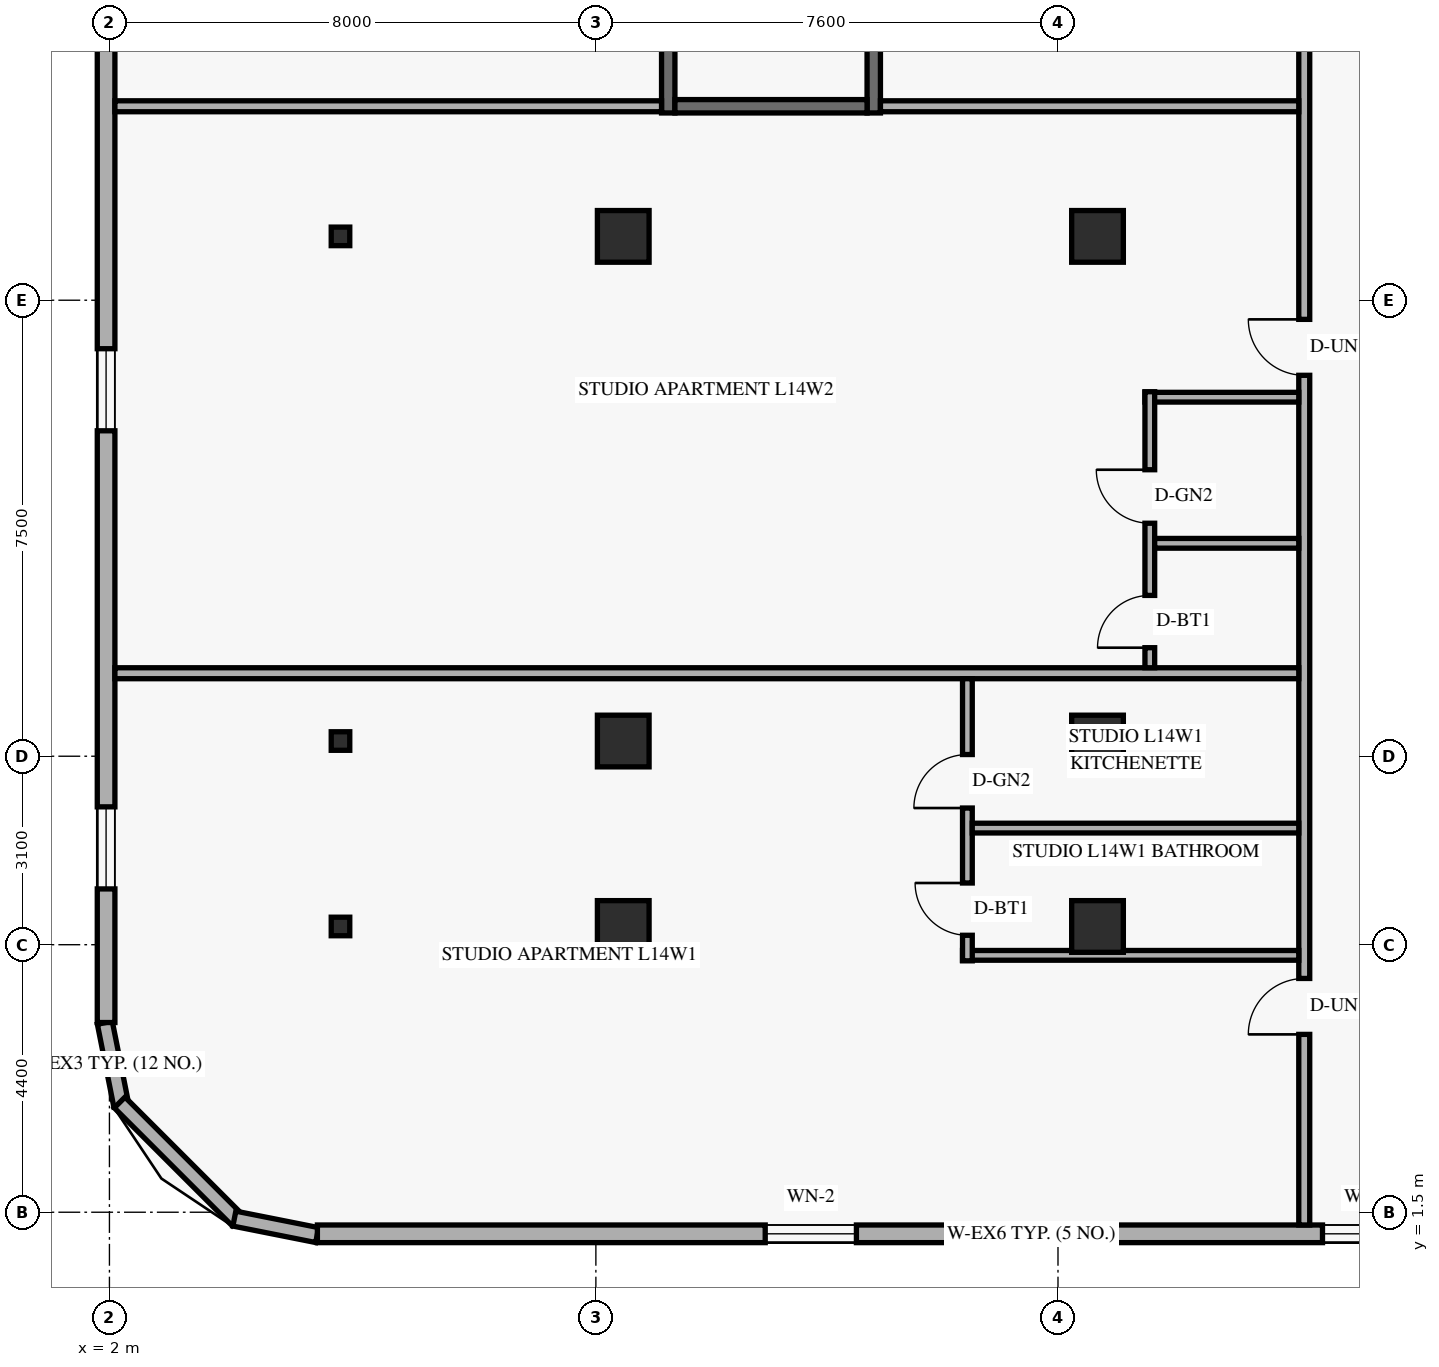
"""IFC4 building model, lengths in metres.
Left out: names, types, materials, properties, quantities, classifications, styles, units other than length and angle.
Written with IfcOpenShell. Run it as: python <this file> out.ifc"""

import sys

from ifc_helpers import new_model, si_unit, direction, frame, frame_2d, origin, origin_2d, place, context, subcontext, project, spatial, rectangle, hollow_rectangle, extrude, element, fill, save


model = new_model("IFC4")
c1 = context("Model", 3, precision=1e-05, world=origin(), true_north=direction((0.0, 1.0)))
c2 = subcontext(c1, "Body", "Model", "MODEL_VIEW")
j1 = project(units=[si_unit("LENGTHUNIT", "METRE"), si_unit("PLANEANGLEUNIT", "RADIAN")], contexts=[c1])
p1 = place(None, origin())
s1 = spatial("IfcSite", under=j1, at=p1, CompositionType="ELEMENT")
p2 = place(p1, origin())
s2 = spatial("IfcBuilding", under=s1, at=p2, CompositionType="ELEMENT")
p3 = place(p2, frame((0.0, 0.0, 56.4)))
s3 = spatial("IfcBuildingStorey", under=s2, at=p3, CompositionType="ELEMENT", Elevation=56.4)
for number, where, z_axis, x_axis in (
    (1, (11.19, 19.58, 0.0), (0.0, 0.0, 1.0), (0.0, 1.0, 0.0)),
    (2, (14.57, 19.58, 0.0), (0.0, 0.0, 1.0), (0.0, 1.0, 0.0)),
):
    element("IfcWall", number, at=place(p3, frame(where, z_axis=z_axis, x_axis=x_axis)), inside=s3, PredefinedType="SHEAR", context=c2, shape_type="SweptSolid", body=[
        extrude(rectangle(XDim=7.98, YDim=0.22, at=frame_2d((3.99, 0.0))), origin(), (0.0, 0.0, 1.0), 2.657),
    ])
p4 = place(p3, frame((11.3, 19.69, 0.0), z_axis=(0.0, 0.0, 1.0), x_axis=(1.0, 0.0, 0.0)))
e3 = element("IfcWall", 3, at=p4, inside=s3, PredefinedType="SHEAR", context=c2, shape_type="SweptSolid", body=[
    extrude(rectangle(XDim=3.16, YDim=0.22, at=frame_2d((1.58, 0.0))), origin(), (0.0, 0.0, 1.0), 2.657),
])
for number, where, z_axis, x_axis in (
    (4, (5.8, 6.2, 0.0), (0.0, 0.0, 1.0), (1.0, 0.0, 0.0)),
    (5, (5.8, 9.25, 0.0), (0.0, 0.0, 1.0), (1.0, 0.0, 0.0)),
    (6, (5.8, 17.55, 0.0), (0.0, 0.0, 1.0), (1.0, 0.0, 0.0)),
):
    element("IfcColumn", number, at=place(p3, frame(where, z_axis=z_axis, x_axis=x_axis)), inside=s3, PredefinedType="COLUMN", context=c2, shape_type="SweptSolid", body=[
        extrude(hollow_rectangle(XDim=0.305, YDim=0.305, WallThickness=0.013, at=origin_2d()), origin(), (0.0, 0.0, 1.0), 3.6),
    ])
for number, where, z_axis, x_axis in (
    (7, (10.45, 6.2, 0.0), (0.0, 0.0, 1.0), (1.0, 0.0, 0.0)),
    (8, (10.45, 9.25, 0.0), (0.0, 0.0, 1.0), (1.0, 0.0, 0.0)),
    (9, (10.45, 17.55, 0.0), (0.0, 0.0, 1.0), (1.0, 0.0, 0.0)),
    (10, (18.25, 6.2, 0.0), (0.0, 0.0, 1.0), (1.0, 0.0, 0.0)),
    (11, (18.25, 9.25, 0.0), (0.0, 0.0, 1.0), (1.0, 0.0, 0.0)),
    (12, (18.25, 17.55, 0.0), (0.0, 0.0, 1.0), (1.0, 0.0, 0.0)),
):
    element("IfcColumn", number, at=place(p3, frame(where, z_axis=z_axis, x_axis=x_axis)), inside=s3, PredefinedType="COLUMN", context=c2, shape_type="SweptSolid", body=[
        extrude(rectangle(XDim=0.85, YDim=0.85, at=origin_2d()), origin(), (0.0, 0.0, 1.0), 3.6),
    ])
p5 = place(p3, frame((1.924, 4.616, 0.0), z_axis=(0.0, 0.0, 1.0), x_axis=(0.19496651342, -0.980809899341, 0.0)))
e13 = element("IfcWall", 13, at=p5, inside=s3, PredefinedType="SOLIDWALL", context=c2, shape_type="SweptSolid", body=[
    extrude(rectangle(XDim=1.389, YDim=0.25, at=frame_2d((0.694, 0.0))), origin(), (0.0, 0.0, 1.0), 3.35),
])
p6 = place(p3, frame((2.168, 3.305, 0.0), z_axis=(0.0, 0.0, 1.0), x_axis=(0.707106781187, -0.707106781187, 0.0)))
e14 = element("IfcWall", 14, at=p6, inside=s3, PredefinedType="SOLIDWALL", context=c2, shape_type="SweptSolid", body=[
    extrude(rectangle(XDim=2.739, YDim=0.25, at=frame_2d((1.37, 0.0))), origin(), (0.0, 0.0, 1.0), 3.35),
])
p7 = place(p3, frame((4.054, 1.395, 0.0), z_axis=(0.0, 0.0, 1.0), x_axis=(0.980809899341, -0.19496651342, 0.0)))
e15 = element("IfcWall", 15, at=p7, inside=s3, PredefinedType="SOLIDWALL", context=c2, shape_type="SweptSolid", body=[
    extrude(rectangle(XDim=1.389, YDim=0.25, at=frame_2d((0.694, 0.0))), origin(), (0.0, 0.0, 1.0), 3.35),
])
p8 = place(p3, frame((5.42, 1.145, 0.0), z_axis=(0.0, 0.0, 1.0), x_axis=(1.0, 0.0, 0.0)))
e16 = element("IfcWall", 16, at=p8, inside=s3, PredefinedType="SOLIDWALL", context=c2, shape_type="SweptSolid", body=[
    extrude(rectangle(XDim=23.481, YDim=0.29, at=frame_2d((11.741, 0.0))), origin(), (0.0, 0.0, 1.0), 3.35),
])
p9 = place(p8, frame((7.365, 0.0, 0.85)))
e17 = element("IfcOpeningElement", 17, at=p9, cuts=e16, PredefinedType="OPENING", context=c2, shape_type="SweptSolid", body=[
    extrude(rectangle(XDim=1.5, YDim=1.55, at=frame_2d((0.75, 0.775))), frame((0.0, 0.155, 0.0), z_axis=(0.0, -1.0, 0.0), x_axis=(1.0, 0.0, 0.0)), (0.0, 0.0, 1.0), 0.31),
])
p10 = place(p8, frame((16.53, 0.0, 0.85)))
e18 = element("IfcOpeningElement", 18, at=p10, cuts=e16, PredefinedType="OPENING", context=c2, shape_type="SweptSolid", body=[
    extrude(rectangle(XDim=1.5, YDim=1.55, at=frame_2d((0.75, 0.775))), frame((0.0, 0.155, 0.0), z_axis=(0.0, -1.0, 0.0), x_axis=(1.0, 0.0, 0.0)), (0.0, 0.0, 1.0), 0.31),
])
p11 = place(p8, frame((20.156, 0.0, 0.85)))
e19 = element("IfcOpeningElement", 19, at=p11, cuts=e16, PredefinedType="OPENING", context=c2, shape_type="SweptSolid", body=[
    extrude(rectangle(XDim=1.5, YDim=1.55, at=frame_2d((0.75, 0.775))), frame((0.0, 0.155, 0.0), z_axis=(0.0, -1.0, 0.0), x_axis=(1.0, 0.0, 0.0)), (0.0, 0.0, 1.0), 0.31),
])
p12 = place(p3, frame((1.945, 43.38, 0.0), z_axis=(0.0, 0.0, 1.0), x_axis=(0.0, -1.0, 0.0)))
e20 = element("IfcWall", 20, at=p12, inside=s3, PredefinedType="SOLIDWALL", context=c2, shape_type="SweptSolid", body=[
    extrude(rectangle(XDim=38.76, YDim=0.29, at=frame_2d((19.38, 0.0))), origin(), (0.0, 0.0, 1.0), 3.35),
])
p13 = place(p12, frame((35.212, 0.0, 0.85)))
e21 = element("IfcOpeningElement", 21, at=p13, cuts=e20, PredefinedType="OPENING", context=c2, shape_type="SweptSolid", body=[
    extrude(rectangle(XDim=1.35, YDim=1.55, at=frame_2d((0.675, 0.775))), frame((0.0, 0.155, 0.0), z_axis=(0.0, -1.0, 0.0), x_axis=(1.0, 0.0, 0.0)), (0.0, 0.0, 1.0), 0.31),
])
p14 = place(p12, frame((27.677, 0.0, 0.85)))
e22 = element("IfcOpeningElement", 22, at=p14, cuts=e20, PredefinedType="OPENING", context=c2, shape_type="SweptSolid", body=[
    extrude(rectangle(XDim=1.35, YDim=1.55, at=frame_2d((0.675, 0.775))), frame((0.0, 0.155, 0.0), z_axis=(0.0, -1.0, 0.0), x_axis=(1.0, 0.0, 0.0)), (0.0, 0.0, 1.0), 0.31),
])
p15 = place(p12, frame((18.19, 0.0, 0.85)))
e23 = element("IfcOpeningElement", 23, at=p15, cuts=e20, PredefinedType="OPENING", context=c2, shape_type="SweptSolid", body=[
    extrude(rectangle(XDim=1.35, YDim=1.55, at=frame_2d((0.675, 0.775))), frame((0.0, 0.155, 0.0), z_axis=(0.0, -1.0, 0.0), x_axis=(1.0, 0.0, 0.0)), (0.0, 0.0, 1.0), 0.31),
])
p16 = place(p12, frame((8.965, 0.0, 0.85)))
e24 = element("IfcOpeningElement", 24, at=p16, cuts=e20, PredefinedType="OPENING", context=c2, shape_type="SweptSolid", body=[
    extrude(rectangle(XDim=1.35, YDim=1.55, at=frame_2d((0.675, 0.775))), frame((0.0, 0.155, 0.0), z_axis=(0.0, -1.0, 0.0), x_axis=(1.0, 0.0, 0.0)), (0.0, 0.0, 1.0), 0.31),
])
p17 = place(p12, frame((1.945, 0.0, 0.85)))
e25 = element("IfcOpeningElement", 25, at=p17, cuts=e20, PredefinedType="OPENING", context=c2, shape_type="SweptSolid", body=[
    extrude(rectangle(XDim=1.35, YDim=1.55, at=frame_2d((0.675, 0.775))), frame((0.0, 0.155, 0.0), z_axis=(0.0, -1.0, 0.0), x_axis=(1.0, 0.0, 0.0)), (0.0, 0.0, 1.0), 0.31),
])
p18 = place(p3, frame((21.65, 1.29, 0.0), z_axis=(0.0, 0.0, 1.0), x_axis=(0.0, 1.0, 0.0)))
e26 = element("IfcWall", 26, at=p18, inside=s3, PredefinedType="STANDARD", context=c2, shape_type="SweptSolid", body=[
    extrude(rectangle(XDim=45.42, YDim=0.18, at=frame_2d((22.71, 0.0))), origin(), (0.0, 0.0, 1.0), 2.639),
])
p19 = place(p18, frame((3.135, 0.0, 0.0)))
e27 = element("IfcOpeningElement", 27, at=p19, cuts=e26, PredefinedType="OPENING", context=c2, shape_type="SweptSolid", body=[
    extrude(rectangle(XDim=0.92, YDim=2.15, at=frame_2d((0.46, 1.075))), frame((0.0, 0.1, 0.0), z_axis=(0.0, -1.0, 0.0), x_axis=(1.0, 0.0, 0.0)), (0.0, 0.0, 1.0), 0.2),
])
p20 = place(p18, frame((13.975, 0.0, 0.0)))
e28 = element("IfcOpeningElement", 28, at=p20, cuts=e26, PredefinedType="OPENING", context=c2, shape_type="SweptSolid", body=[
    extrude(rectangle(XDim=0.92, YDim=2.15, at=frame_2d((0.46, 1.075))), frame((0.0, 0.1, 0.0), z_axis=(0.0, -1.0, 0.0), x_axis=(1.0, 0.0, 0.0)), (0.0, 0.0, 1.0), 0.2),
])
p21 = place(p18, frame((20.91, 0.0, 0.0)))
e29 = element("IfcOpeningElement", 29, at=p21, cuts=e26, PredefinedType="OPENING", context=c2, shape_type="SweptSolid", body=[
    extrude(rectangle(XDim=0.95, YDim=2.15, at=frame_2d((0.475, 1.075))), frame((0.0, 0.1, 0.0), z_axis=(0.0, -1.0, 0.0), x_axis=(1.0, 0.0, 0.0)), (0.0, 0.0, 1.0), 0.2),
])
p22 = place(p18, frame((32.95, 0.0, 0.0)))
e30 = element("IfcOpeningElement", 30, at=p22, cuts=e26, PredefinedType="OPENING", context=c2, shape_type="SweptSolid", body=[
    extrude(rectangle(XDim=0.92, YDim=2.15, at=frame_2d((0.46, 1.075))), frame((0.0, 0.1, 0.0), z_axis=(0.0, -1.0, 0.0), x_axis=(1.0, 0.0, 0.0)), (0.0, 0.0, 1.0), 0.2),
])
p23 = place(p18, frame((41.85, 0.0, 0.0)))
e31 = element("IfcOpeningElement", 31, at=p23, cuts=e26, PredefinedType="OPENING", context=c2, shape_type="SweptSolid", body=[
    extrude(rectangle(XDim=0.92, YDim=2.15, at=frame_2d((0.46, 1.075))), frame((0.0, 0.1, 0.0), z_axis=(0.0, -1.0, 0.0), x_axis=(1.0, 0.0, 0.0)), (0.0, 0.0, 1.0), 0.2),
])
p24 = place(p3, frame((2.09, 10.365, 0.0), z_axis=(0.0, 0.0, 1.0), x_axis=(1.0, 0.0, 0.0)))
e32 = element("IfcWall", 32, at=p24, inside=s3, PredefinedType="PARTITIONING", context=c2, shape_type="SweptSolid", body=[
    extrude(rectangle(XDim=19.47, YDim=0.18, at=frame_2d((9.735, 0.0))), origin(), (0.0, 0.0, 1.0), 2.639),
])
p25 = place(p3, frame((2.09, 19.69, 0.0), z_axis=(0.0, 0.0, 1.0), x_axis=(1.0, 0.0, 0.0)))
e33 = element("IfcWall", 33, at=p25, inside=s3, PredefinedType="PARTITIONING", context=c2, shape_type="SweptSolid", body=[
    extrude(rectangle(XDim=8.99, YDim=0.18, at=frame_2d((4.495, 0.0))), origin(), (0.0, 0.0, 1.0), 2.639),
])
p26 = place(p3, frame((14.68, 19.69, 0.0), z_axis=(0.0, 0.0, 1.0), x_axis=(1.0, 0.0, 0.0)))
e34 = element("IfcWall", 34, at=p26, inside=s3, PredefinedType="PARTITIONING", context=c2, shape_type="SweptSolid", body=[
    extrude(rectangle(XDim=6.88, YDim=0.18, at=frame_2d((3.44, 0.0))), origin(), (0.0, 0.0, 1.0), 2.639),
])
p27 = place(p3, frame((16.03, 5.725, 0.0), z_axis=(0.0, 0.0, 1.0), x_axis=(1.0, 0.0, 0.0)))
e35 = element("IfcWall", 35, at=p27, inside=s3, PredefinedType="PLUMBINGWALL", context=c2, shape_type="SweptSolid", body=[
    extrude(rectangle(XDim=5.53, YDim=0.16, at=frame_2d((2.765, 0.0))), origin(), (0.0, 0.0, 1.0), 3.35),
])
p28 = place(p3, frame((16.11, 5.635, 0.0), z_axis=(0.0, 0.0, 1.0), x_axis=(0.0, 1.0, 0.0)))
e36 = element("IfcWall", 36, at=p28, inside=s3, PredefinedType="PLUMBINGWALL", context=c2, shape_type="SweptSolid", body=[
    extrude(rectangle(XDim=4.64, YDim=0.16, at=frame_2d((2.32, 0.0))), origin(), (0.0, 0.0, 1.0), 2.639),
])
p29 = place(p28, frame((0.42, 0.0, 0.0)))
e37 = element("IfcOpeningElement", 37, at=p29, cuts=e36, PredefinedType="OPENING", context=c2, shape_type="SweptSolid", body=[
    extrude(rectangle(XDim=0.86, YDim=2.12, at=frame_2d((0.43, 1.06))), frame((0.0, 0.09, 0.0), z_axis=(0.0, -1.0, 0.0), x_axis=(1.0, 0.0, 0.0)), (0.0, 0.0, 1.0), 0.18),
])
p30 = place(p28, frame((2.513, 0.0, 0.0)))
e38 = element("IfcOpeningElement", 38, at=p30, cuts=e36, PredefinedType="OPENING", context=c2, shape_type="SweptSolid", body=[
    extrude(rectangle(XDim=0.88, YDim=2.12, at=frame_2d((0.44, 1.06))), frame((0.0, 0.09, 0.0), z_axis=(0.0, -1.0, 0.0), x_axis=(1.0, 0.0, 0.0)), (0.0, 0.0, 1.0), 0.18),
])
p31 = place(p3, frame((16.19, 7.818, 0.0), z_axis=(0.0, 0.0, 1.0), x_axis=(1.0, 0.0, 0.0)))
e39 = element("IfcWall", 39, at=p31, inside=s3, PredefinedType="PLUMBINGWALL", context=c2, shape_type="SweptSolid", body=[
    extrude(rectangle(XDim=5.37, YDim=0.16, at=frame_2d((2.685, 0.0))), origin(), (0.0, 0.0, 1.0), 2.639),
])
p32 = place(p3, frame((19.03, 14.905, 0.0), z_axis=(0.0, 0.0, 1.0), x_axis=(1.0, 0.0, 0.0)))
e40 = element("IfcWall", 40, at=p32, inside=s3, PredefinedType="PLUMBINGWALL", context=c2, shape_type="SweptSolid", body=[
    extrude(rectangle(XDim=2.53, YDim=0.16, at=frame_2d((1.265, 0.0))), origin(), (0.0, 0.0, 1.0), 3.35),
])
p33 = place(p3, frame((19.11, 10.455, 0.0), z_axis=(0.0, 0.0, 1.0), x_axis=(0.0, 1.0, 0.0)))
e41 = element("IfcWall", 41, at=p33, inside=s3, PredefinedType="PLUMBINGWALL", context=c2, shape_type="SweptSolid", body=[
    extrude(rectangle(XDim=4.54, YDim=0.16, at=frame_2d((2.27, 0.0))), origin(), (0.0, 0.0, 1.0), 2.922),
])
p34 = place(p33, frame((0.33, 0.0, 0.0)))
e42 = element("IfcOpeningElement", 42, at=p34, cuts=e41, PredefinedType="OPENING", context=c2, shape_type="SweptSolid", body=[
    extrude(rectangle(XDim=0.86, YDim=2.12, at=frame_2d((0.43, 1.06))), frame((0.0, 0.09, 0.0), z_axis=(0.0, -1.0, 0.0), x_axis=(1.0, 0.0, 0.0)), (0.0, 0.0, 1.0), 0.18),
])
p35 = place(p33, frame((2.377, 0.0, 0.0)))
e43 = element("IfcOpeningElement", 43, at=p35, cuts=e41, PredefinedType="OPENING", context=c2, shape_type="SweptSolid", body=[
    extrude(rectangle(XDim=0.88, YDim=2.12, at=frame_2d((0.44, 1.06))), frame((0.0, 0.09, 0.0), z_axis=(0.0, -1.0, 0.0), x_axis=(1.0, 0.0, 0.0)), (0.0, 0.0, 1.0), 0.18),
])
p36 = place(p3, frame((19.19, 12.502, 0.0), z_axis=(0.0, 0.0, 1.0), x_axis=(1.0, 0.0, 0.0)))
e44 = element("IfcWall", 44, at=p36, inside=s3, PredefinedType="PLUMBINGWALL", context=c2, shape_type="SweptSolid", body=[
    extrude(rectangle(XDim=2.37, YDim=0.16, at=frame_2d((1.185, 0.0))), origin(), (0.0, 0.0, 1.0), 3.35),
])
p37 = place(p9, origin())
e45 = element("IfcWindow", 45, at=p37, inside=s3, PartitioningType="SINGLE_PANEL", PredefinedType="WINDOW", context=c2, shape_type="SweptSolid", body=[
    extrude(rectangle(XDim=1.5, YDim=1.55, at=frame_2d((0.75, 0.775))), frame((0.0, 0.03, 0.0), z_axis=(0.0, -1.0, 0.0), x_axis=(1.0, 0.0, 0.0)), (0.0, 0.0, 1.0), 0.06),
])
fill(e17, e45)
p38 = place(p10, origin())
e46 = element("IfcWindow", 46, at=p38, inside=s3, PartitioningType="SINGLE_PANEL", PredefinedType="WINDOW", context=c2, shape_type="SweptSolid", body=[
    extrude(rectangle(XDim=1.5, YDim=1.55, at=frame_2d((0.75, 0.775))), frame((0.0, 0.03, 0.0), z_axis=(0.0, -1.0, 0.0), x_axis=(1.0, 0.0, 0.0)), (0.0, 0.0, 1.0), 0.06),
])
fill(e18, e46)
p39 = place(p13, origin())
e47 = element("IfcWindow", 47, at=p39, inside=s3, PartitioningType="SINGLE_PANEL", PredefinedType="WINDOW", context=c2, shape_type="SweptSolid", body=[
    extrude(rectangle(XDim=1.35, YDim=1.55, at=frame_2d((0.675, 0.775))), frame((0.0, 0.03, 0.0), z_axis=(0.0, -1.0, 0.0), x_axis=(1.0, 0.0, 0.0)), (0.0, 0.0, 1.0), 0.06),
])
fill(e21, e47)
p40 = place(p14, origin())
e48 = element("IfcWindow", 48, at=p40, inside=s3, PartitioningType="SINGLE_PANEL", PredefinedType="WINDOW", context=c2, shape_type="SweptSolid", body=[
    extrude(rectangle(XDim=1.35, YDim=1.55, at=frame_2d((0.675, 0.775))), frame((0.0, 0.03, 0.0), z_axis=(0.0, -1.0, 0.0), x_axis=(1.0, 0.0, 0.0)), (0.0, 0.0, 1.0), 0.06),
])
fill(e22, e48)
p41 = place(p19, origin())
e49 = element("IfcDoor", 49, at=p41, inside=s3, OperationType="SINGLE_SWING_LEFT", PredefinedType="DOOR", context=c2, shape_type="SweptSolid", body=[
    extrude(rectangle(XDim=0.92, YDim=2.15, at=frame_2d((0.46, 1.075))), frame((0.0, 0.025, 0.0), z_axis=(0.0, -1.0, 0.0), x_axis=(1.0, 0.0, 0.0)), (0.0, 0.0, 1.0), 0.05),
])
fill(e27, e49)
p42 = place(p29, origin())
e50 = element("IfcDoor", 50, at=p42, inside=s3, OperationType="SINGLE_SWING_RIGHT", PredefinedType="DOOR", context=c2, shape_type="SweptSolid", body=[
    extrude(rectangle(XDim=0.86, YDim=2.12, at=frame_2d((0.43, 1.06))), frame((0.0, 0.025, 0.0), z_axis=(0.0, -1.0, 0.0), x_axis=(1.0, 0.0, 0.0)), (0.0, 0.0, 1.0), 0.05),
])
fill(e37, e50)
p43 = place(p30, origin())
e51 = element("IfcDoor", 51, at=p43, inside=s3, OperationType="SINGLE_SWING_LEFT", PredefinedType="DOOR", context=c2, shape_type="SweptSolid", body=[
    extrude(rectangle(XDim=0.88, YDim=2.12, at=frame_2d((0.44, 1.06))), frame((0.0, 0.025, 0.0), z_axis=(0.0, -1.0, 0.0), x_axis=(1.0, 0.0, 0.0)), (0.0, 0.0, 1.0), 0.05),
])
fill(e38, e51)
p44 = place(p20, origin())
e52 = element("IfcDoor", 52, at=p44, inside=s3, OperationType="SINGLE_SWING_RIGHT", PredefinedType="DOOR", context=c2, shape_type="SweptSolid", body=[
    extrude(rectangle(XDim=0.92, YDim=2.15, at=frame_2d((0.46, 1.075))), frame((0.0, 0.025, 0.0), z_axis=(0.0, -1.0, 0.0), x_axis=(1.0, 0.0, 0.0)), (0.0, 0.0, 1.0), 0.05),
])
fill(e28, e52)
p45 = place(p34, origin())
e53 = element("IfcDoor", 53, at=p45, inside=s3, OperationType="SINGLE_SWING_LEFT", PredefinedType="DOOR", context=c2, shape_type="SweptSolid", body=[
    extrude(rectangle(XDim=0.86, YDim=2.12, at=frame_2d((0.43, 1.06))), frame((0.0, 0.025, 0.0), z_axis=(0.0, -1.0, 0.0), x_axis=(1.0, 0.0, 0.0)), (0.0, 0.0, 1.0), 0.05),
])
fill(e42, e53)
p46 = place(p35, origin())
e54 = element("IfcDoor", 54, at=p46, inside=s3, OperationType="SINGLE_SWING_RIGHT", PredefinedType="DOOR", context=c2, shape_type="SweptSolid", body=[
    extrude(rectangle(XDim=0.88, YDim=2.12, at=frame_2d((0.44, 1.06))), frame((0.0, 0.025, 0.0), z_axis=(0.0, -1.0, 0.0), x_axis=(1.0, 0.0, 0.0)), (0.0, 0.0, 1.0), 0.05),
])
fill(e43, e54)
save(model, sys.argv[1])
